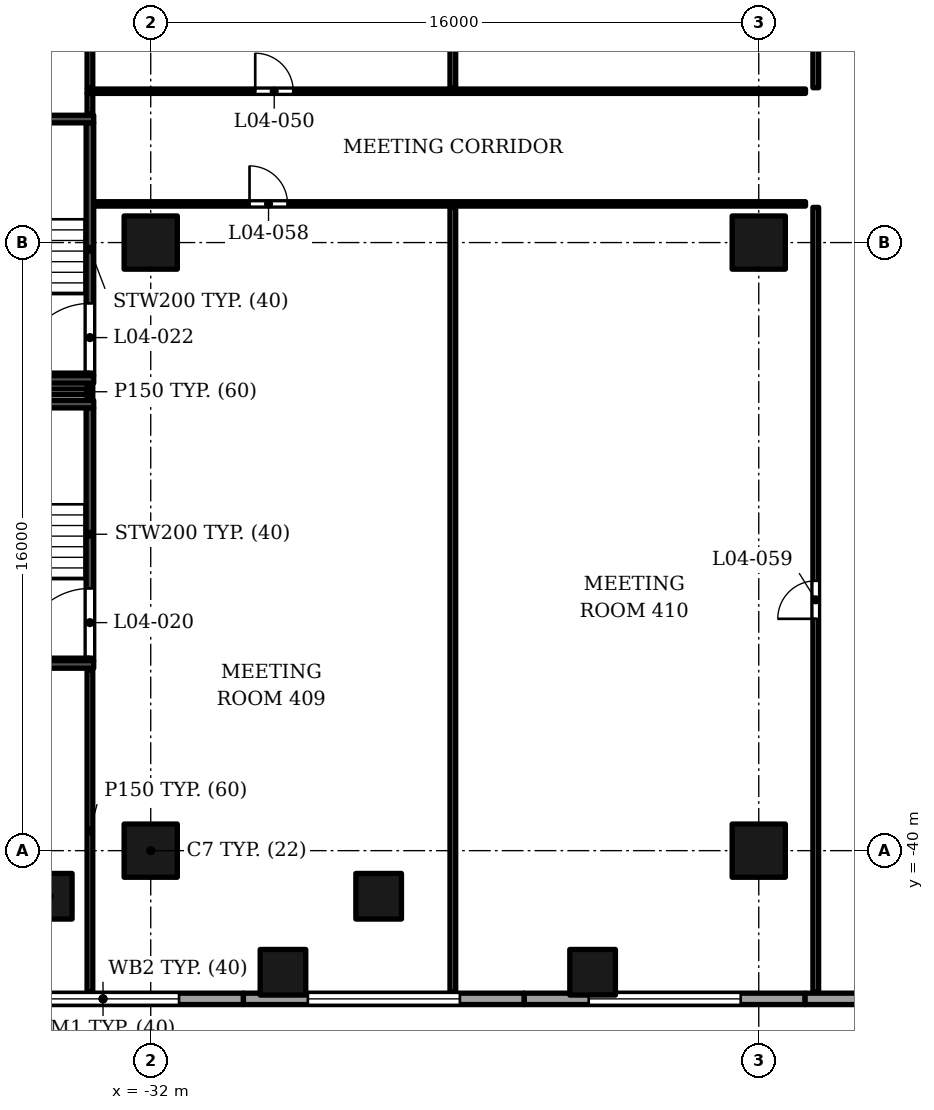
"""IFC4 building model, lengths in metres.
Left out: names, types, materials, properties, quantities, classifications, styles, units other than length and angle.
Written with IfcOpenShell. Run it as: python <this file> out.ifc"""

import sys

from ifc_helpers import new_model, si_unit, direction, frame, frame_2d, origin, origin_2d, place, context, subcontext, project, spatial, rectangle, extrude, element, fill, save


model = new_model("IFC4")
c1 = context("Model", 3, precision=1e-05, world=origin(), true_north=direction((0.0, 1.0)))
c2 = subcontext(c1, "Body", "Model", "MODEL_VIEW")
j1 = project(units=[si_unit("LENGTHUNIT", "METRE"), si_unit("PLANEANGLEUNIT", "RADIAN")], contexts=[c1])
p1 = place(None, origin())
s1 = spatial("IfcSite", under=j1, at=p1, CompositionType="ELEMENT")
p2 = place(p1, origin())
s2 = spatial("IfcBuilding", under=s1, at=p2, CompositionType="ELEMENT")
p3 = place(p2, frame((0.0, 0.0, 34.5)))
s3 = spatial("IfcBuildingStorey", under=s2, at=p3, CompositionType="ELEMENT", Elevation=34.5)
for number, where, z_axis, x_axis in (
    (1, (-32.0, -40.0, 0.0), (0.0, 0.0, 1.0), (1.0, 0.0, 0.0)),
    (2, (-32.0, -24.0, 0.0), (0.0, 0.0, 1.0), (1.0, 0.0, 0.0)),
    (3, (-16.0, -40.0, 0.0), (0.0, 0.0, 1.0), (1.0, 0.0, 0.0)),
    (4, (-16.0, -24.0, 0.0), (0.0, 0.0, 1.0), (1.0, 0.0, 0.0)),
):
    element("IfcColumn", number, at=place(p3, frame(where, z_axis=z_axis, x_axis=x_axis)), inside=s3, PredefinedType="COLUMN", context=c2, shape_type="SweptSolid", body=[
        extrude(rectangle(XDim=1.4, YDim=1.4, at=origin_2d()), origin(), (0.0, 0.0, 1.0), 5.5),
    ])
for number, where, z_axis, x_axis in (
    (5, (-34.669, -41.2, 0.0), (0.0, 0.0, 1.0), (1.0, 0.0, 0.0)),
    (6, (-26.002, -41.2, 0.0), (0.0, 0.0, 1.0), (1.0, 0.0, 0.0)),
    (7, (-20.372, -43.2, 0.0), (0.0, 0.0, 1.0), (1.0, 0.0, 0.0)),
    (8, (-28.52, -43.2, 0.0), (0.0, 0.0, 1.0), (1.0, 0.0, 0.0)),
):
    element("IfcColumn", number, at=place(p3, frame(where, z_axis=z_axis, x_axis=x_axis)), inside=s3, PredefinedType="COLUMN", context=c2, shape_type="SweptSolid", body=[
        extrude(rectangle(XDim=1.2, YDim=1.2, at=origin_2d()), origin(), (0.0, 0.0, 1.0), 5.5),
    ])
p4 = place(p3, frame((-36.95, -43.9, 0.0), z_axis=(0.0, 0.0, 1.0), x_axis=(1.0, 0.0, 0.0)))
e9 = element("IfcWall", 9, at=p4, inside=s3, PredefinedType="SOLIDWALL", context=c2, shape_type="SweptSolid", body=[
    extrude(rectangle(XDim=7.39, YDim=0.3, at=frame_2d((3.695, 0.0))), origin(), (0.0, 0.0, 1.0), 4.1),
])
p5 = place(p4, frame((1.695, 0.0, 1.0)))
e10 = element("IfcOpeningElement", 10, at=p5, cuts=e9, PredefinedType="OPENING", context=c2, shape_type="SweptSolid", body=[
    extrude(rectangle(XDim=4.0, YDim=1.8, at=frame_2d((2.0, 0.9))), frame((0.0, 0.16, 0.0), z_axis=(0.0, -1.0, 0.0), x_axis=(1.0, 0.0, 0.0)), (0.0, 0.0, 1.0), 0.32),
])
p6 = place(p3, frame((-29.56, -43.9, 0.0), z_axis=(0.0, 0.0, 1.0), x_axis=(1.0, 0.0, 0.0)))
e11 = element("IfcWall", 11, at=p6, inside=s3, PredefinedType="SOLIDWALL", context=c2, shape_type="SweptSolid", body=[
    extrude(rectangle(XDim=7.39, YDim=0.3, at=frame_2d((3.695, 0.0))), origin(), (0.0, 0.0, 1.0), 4.1),
])
p7 = place(p6, frame((1.695, 0.0, 1.0)))
e12 = element("IfcOpeningElement", 12, at=p7, cuts=e11, PredefinedType="OPENING", context=c2, shape_type="SweptSolid", body=[
    extrude(rectangle(XDim=4.0, YDim=1.8, at=frame_2d((2.0, 0.9))), frame((0.0, 0.16, 0.0), z_axis=(0.0, -1.0, 0.0), x_axis=(1.0, 0.0, 0.0)), (0.0, 0.0, 1.0), 0.32),
])
p8 = place(p3, frame((-22.17, -43.9, 0.0), z_axis=(0.0, 0.0, 1.0), x_axis=(1.0, 0.0, 0.0)))
e13 = element("IfcWall", 13, at=p8, inside=s3, PredefinedType="SOLIDWALL", context=c2, shape_type="SweptSolid", body=[
    extrude(rectangle(XDim=7.39, YDim=0.3, at=frame_2d((3.695, 0.0))), origin(), (0.0, 0.0, 1.0), 4.1),
])
p9 = place(p8, frame((1.695, 0.0, 1.0)))
e14 = element("IfcOpeningElement", 14, at=p9, cuts=e13, PredefinedType="OPENING", context=c2, shape_type="SweptSolid", body=[
    extrude(rectangle(XDim=4.0, YDim=1.8, at=frame_2d((2.0, 0.9))), frame((0.0, 0.16, 0.0), z_axis=(0.0, -1.0, 0.0), x_axis=(1.0, 0.0, 0.0)), (0.0, 0.0, 1.0), 0.32),
])
p10 = place(p3, frame((-14.78, -43.9, 0.0), z_axis=(0.0, 0.0, 1.0), x_axis=(1.0, 0.0, 0.0)))
e15 = element("IfcWall", 15, at=p10, inside=s3, PredefinedType="SOLIDWALL", context=c2, shape_type="SweptSolid", body=[
    extrude(rectangle(XDim=7.39, YDim=0.3, at=frame_2d((3.695, 0.0))), origin(), (0.0, 0.0, 1.0), 4.1),
])
p11 = place(p10, frame((1.695, 0.0, 1.0)))
e16 = element("IfcOpeningElement", 16, at=p11, cuts=e15, PredefinedType="OPENING", context=c2, shape_type="SweptSolid", body=[
    extrude(rectangle(XDim=4.0, YDim=1.8, at=frame_2d((2.0, 0.9))), frame((0.0, 0.16, 0.0), z_axis=(0.0, -1.0, 0.0), x_axis=(1.0, 0.0, 0.0)), (0.0, 0.0, 1.0), 0.32),
])
for number, where, z_axis, x_axis in (
    (17, (-37.0, -43.85, 5.5), (0.0, 0.0, 1.0), (1.0, 0.0, 0.0)),
    (18, (-22.2, -43.85, 5.5), (0.0, 0.0, 1.0), (1.0, 0.0, 0.0)),
):
    element("IfcWall", number, at=place(p3, frame(where, z_axis=z_axis, x_axis=x_axis)), inside=s3, PredefinedType="PARAPET", context=c2, shape_type="SweptSolid", body=[
        extrude(rectangle(XDim=14.8, YDim=0.3, at=frame_2d((7.4, 0.0))), origin(), (0.0, 0.0, 1.0), 1.1),
    ])
for number, where, z_axis, x_axis in (
    (19, (-38.37, -35.1, 0.0), (0.0, 0.0, 1.0), (1.0, 0.0, 0.0)),
    (20, (-38.37, -28.25, 0.0), (0.0, 0.0, 1.0), (1.0, 0.0, 0.0)),
):
    element("IfcWall", number, at=place(p3, frame(where, z_axis=z_axis, x_axis=x_axis)), inside=s3, PredefinedType="SOLIDWALL", context=c2, shape_type="SweptSolid", body=[
        extrude(rectangle(XDim=4.87, YDim=0.2, at=frame_2d((2.435, 0.0))), origin(), (0.0, 0.0, 1.0), 5.05),
    ])
p12 = place(p3, frame((-33.6, -35.0, 0.0), z_axis=(0.0, 0.0, 1.0), x_axis=(0.0, 1.0, 0.0)))
e21 = element("IfcWall", 21, at=p12, inside=s3, PredefinedType="SOLIDWALL", context=c2, shape_type="SweptSolid", body=[
    extrude(rectangle(XDim=6.65, YDim=0.2, at=frame_2d((3.325, 0.0))), origin(), (0.0, 0.0, 1.0), 5.05),
])
p13 = place(p12, frame((0.1, 0.0, 0.0)))
e22 = element("IfcOpeningElement", 22, at=p13, cuts=e21, PredefinedType="OPENING", context=c2, shape_type="SweptSolid", body=[
    extrude(rectangle(XDim=1.8, YDim=2.4, at=frame_2d((0.9, 1.2))), frame((0.0, 0.11, 0.0), z_axis=(0.0, -1.0, 0.0), x_axis=(1.0, 0.0, 0.0)), (0.0, 0.0, 1.0), 0.22),
])
for number, where, z_axis, x_axis in (
    (23, (-38.37, -27.6, 0.0), (0.0, 0.0, 1.0), (1.0, 0.0, 0.0)),
    (24, (-38.37, -20.75, 0.0), (0.0, 0.0, 1.0), (1.0, 0.0, 0.0)),
):
    element("IfcWall", number, at=place(p3, frame(where, z_axis=z_axis, x_axis=x_axis)), inside=s3, PredefinedType="SOLIDWALL", context=c2, shape_type="SweptSolid", body=[
        extrude(rectangle(XDim=4.87, YDim=0.2, at=frame_2d((2.435, 0.0))), origin(), (0.0, 0.0, 1.0), 5.05),
    ])
p14 = place(p3, frame((-33.6, -27.5, 0.0), z_axis=(0.0, 0.0, 1.0), x_axis=(0.0, 1.0, 0.0)))
e25 = element("IfcWall", 25, at=p14, inside=s3, PredefinedType="SOLIDWALL", context=c2, shape_type="SweptSolid", body=[
    extrude(rectangle(XDim=6.65, YDim=0.2, at=frame_2d((3.325, 0.0))), origin(), (0.0, 0.0, 1.0), 5.05),
])
p15 = place(p14, frame((0.1, 0.0, 0.0)))
e26 = element("IfcOpeningElement", 26, at=p15, cuts=e25, PredefinedType="OPENING", context=c2, shape_type="SweptSolid", body=[
    extrude(rectangle(XDim=1.8, YDim=2.4, at=frame_2d((0.9, 1.2))), frame((0.0, 0.11, 0.0), z_axis=(0.0, -1.0, 0.0), x_axis=(1.0, 0.0, 0.0)), (0.0, 0.0, 1.0), 0.22),
])
p16 = place(p3, frame((-33.6, -43.72, 0.0), z_axis=(0.0, 0.0, 1.0), x_axis=(0.0, 1.0, 0.0)))
e27 = element("IfcWall", 27, at=p16, inside=s3, PredefinedType="PARTITIONING", context=c2, shape_type="SweptSolid", body=[
    extrude(rectangle(XDim=8.48, YDim=0.15, at=frame_2d((4.24, 0.0))), origin(), (0.0, 0.0, 1.0), 3.85),
])
p17 = place(p3, frame((-24.05, -43.72, 0.0), z_axis=(0.0, 0.0, 1.0), x_axis=(0.0, 1.0, 0.0)))
e28 = element("IfcWall", 28, at=p17, inside=s3, PredefinedType="PARTITIONING", context=c2, shape_type="SweptSolid", body=[
    extrude(rectangle(XDim=20.645, YDim=0.15, at=frame_2d((10.323, 0.0))), origin(), (0.0, 0.0, 1.0), 3.85),
])
p18 = place(p3, frame((-14.5, -43.72, 0.0), z_axis=(0.0, 0.0, 1.0), x_axis=(0.0, 1.0, 0.0)))
e29 = element("IfcWall", 29, at=p18, inside=s3, PredefinedType="PARTITIONING", context=c2, shape_type="SweptSolid", body=[
    extrude(rectangle(XDim=20.645, YDim=0.15, at=frame_2d((10.323, 0.0))), origin(), (0.0, 0.0, 1.0), 3.85),
])
p19 = place(p18, frame((9.82, 0.0, 0.0)))
e30 = element("IfcOpeningElement", 30, at=p19, cuts=e29, PredefinedType="OPENING", context=c2, shape_type="SweptSolid", body=[
    extrude(rectangle(XDim=1.0, YDim=2.1, at=frame_2d((0.5, 1.05))), frame((0.0, 0.085, 0.0), z_axis=(0.0, -1.0, 0.0), x_axis=(1.0, 0.0, 0.0)), (0.0, 0.0, 1.0), 0.17),
])
p20 = place(p3, frame((-33.6, -28.11, 0.0), z_axis=(0.0, 0.0, 1.0), x_axis=(0.0, 1.0, 0.0)))
e31 = element("IfcWall", 31, at=p20, inside=s3, PredefinedType="PARTITIONING", context=c2, shape_type="SweptSolid", body=[
    extrude(rectangle(XDim=0.37, YDim=0.15, at=frame_2d((0.185, 0.0))), origin(), (0.0, 0.0, 1.0), 5.05),
])
p21 = place(p3, frame((-41.72, -27.925, 0.0), z_axis=(0.0, 0.0, 1.0), x_axis=(1.0, 0.0, 0.0)))
e32 = element("IfcWall", 32, at=p21, inside=s3, PredefinedType="PARTITIONING", context=c2, shape_type="SweptSolid", body=[
    extrude(rectangle(XDim=8.045, YDim=0.15, at=frame_2d((4.022, 0.0))), origin(), (0.0, 0.0, 1.0), 4.15),
])
p22 = place(p3, frame((-33.46, -22.982, 0.0), z_axis=(0.0, 0.0, 1.0), x_axis=(1.0, 0.0, 0.0)))
e33 = element("IfcWall", 33, at=p22, inside=s3, PredefinedType="PARTITIONING", context=c2, shape_type="SweptSolid", body=[
    extrude(rectangle(XDim=18.69, YDim=0.115, at=frame_2d((9.345, 0.0))), origin(), (0.0, 0.0, 1.0), 3.85),
])
p23 = place(p22, frame((4.06, 0.0, 0.0)))
e34 = element("IfcOpeningElement", 34, at=p23, cuts=e33, PredefinedType="OPENING", context=c2, shape_type="SweptSolid", body=[
    extrude(rectangle(XDim=1.0, YDim=2.1, at=frame_2d((0.5, 1.05))), frame((0.0, 0.067, 0.0), z_axis=(0.0, -1.0, 0.0), x_axis=(1.0, 0.0, 0.0)), (0.0, 0.0, 1.0), 0.135),
])
p24 = place(p3, frame((-33.6, -20.61, 0.0), z_axis=(0.0, 0.0, 1.0), x_axis=(0.0, 1.0, 0.0)))
e35 = element("IfcWall", 35, at=p24, inside=s3, PredefinedType="PARTITIONING", context=c2, shape_type="SweptSolid", body=[
    extrude(rectangle(XDim=0.535, YDim=0.15, at=frame_2d((0.268, 0.0))), origin(), (0.0, 0.0, 1.0), 5.05),
])
p25 = place(p3, frame((-33.675, -20.018, 0.0), z_axis=(0.0, 0.0, 1.0), x_axis=(1.0, 0.0, 0.0)))
e36 = element("IfcWall", 36, at=p25, inside=s3, PredefinedType="PARTITIONING", context=c2, shape_type="SweptSolid", body=[
    extrude(rectangle(XDim=18.905, YDim=0.115, at=frame_2d((9.453, 0.0))), origin(), (0.0, 0.0, 1.0), 3.85),
])
p26 = place(p25, frame((4.425, 0.0, 0.0)))
e37 = element("IfcOpeningElement", 37, at=p26, cuts=e36, PredefinedType="OPENING", context=c2, shape_type="SweptSolid", body=[
    extrude(rectangle(XDim=1.0, YDim=2.1, at=frame_2d((0.5, 1.05))), frame((0.0, 0.067, 0.0), z_axis=(0.0, -1.0, 0.0), x_axis=(1.0, 0.0, 0.0)), (0.0, 0.0, 1.0), 0.135),
])
p27 = place(p3, frame((-33.6, -19.925, 0.0), z_axis=(0.0, 0.0, 1.0), x_axis=(0.0, 1.0, 0.0)))
e38 = element("IfcWall", 38, at=p27, inside=s3, PredefinedType="PARTITIONING", context=c2, shape_type="SweptSolid", body=[
    extrude(rectangle(XDim=3.725, YDim=0.15, at=frame_2d((1.863, 0.0))), origin(), (0.0, 0.0, 1.0), 5.05),
])
p28 = place(p3, frame((-24.05, -19.925, 0.0), z_axis=(0.0, 0.0, 1.0), x_axis=(0.0, 1.0, 0.0)))
e39 = element("IfcWall", 39, at=p28, inside=s3, PredefinedType="PARTITIONING", context=c2, shape_type="SweptSolid", body=[
    extrude(rectangle(XDim=17.85, YDim=0.15, at=frame_2d((8.925, 0.0))), origin(), (0.0, 0.0, 1.0), 3.85),
])
p29 = place(p3, frame((-14.5, -19.925, 0.0), z_axis=(0.0, 0.0, 1.0), x_axis=(0.0, 1.0, 0.0)))
e40 = element("IfcWall", 40, at=p29, inside=s3, PredefinedType="PARTITIONING", context=c2, shape_type="SweptSolid", body=[
    extrude(rectangle(XDim=17.85, YDim=0.15, at=frame_2d((8.925, 0.0))), origin(), (0.0, 0.0, 1.0), 3.85),
])
p30 = place(p29, frame((8.525, 0.0, 0.0)))
e41 = element("IfcOpeningElement", 41, at=p30, cuts=e40, PredefinedType="OPENING", context=c2, shape_type="SweptSolid", body=[
    extrude(rectangle(XDim=1.0, YDim=2.1, at=frame_2d((0.5, 1.05))), frame((0.0, 0.085, 0.0), z_axis=(0.0, -1.0, 0.0), x_axis=(1.0, 0.0, 0.0)), (0.0, 0.0, 1.0), 0.17),
])
p31 = place(p5, origin())
e42 = element("IfcWindow", 42, at=p31, inside=s3, PartitioningType="SINGLE_PANEL", PredefinedType="WINDOW", context=c2, shape_type="SweptSolid", body=[
    extrude(rectangle(XDim=4.0, YDim=1.8, at=frame_2d((2.0, 0.9))), frame((0.0, 0.03, 0.0), z_axis=(0.0, -1.0, 0.0), x_axis=(1.0, 0.0, 0.0)), (0.0, 0.0, 1.0), 0.06),
])
fill(e10, e42)
p32 = place(p7, origin())
e43 = element("IfcWindow", 43, at=p32, inside=s3, PartitioningType="SINGLE_PANEL", PredefinedType="WINDOW", context=c2, shape_type="SweptSolid", body=[
    extrude(rectangle(XDim=4.0, YDim=1.8, at=frame_2d((2.0, 0.9))), frame((0.0, 0.03, 0.0), z_axis=(0.0, -1.0, 0.0), x_axis=(1.0, 0.0, 0.0)), (0.0, 0.0, 1.0), 0.06),
])
fill(e12, e43)
p33 = place(p9, origin())
e44 = element("IfcWindow", 44, at=p33, inside=s3, PartitioningType="SINGLE_PANEL", PredefinedType="WINDOW", context=c2, shape_type="SweptSolid", body=[
    extrude(rectangle(XDim=4.0, YDim=1.8, at=frame_2d((2.0, 0.9))), frame((0.0, 0.03, 0.0), z_axis=(0.0, -1.0, 0.0), x_axis=(1.0, 0.0, 0.0)), (0.0, 0.0, 1.0), 0.06),
])
fill(e14, e44)
p34 = place(p13, origin())
e45 = element("IfcDoor", 45, at=p34, inside=s3, OperationType="DOUBLE_DOOR_SINGLE_SWING", PredefinedType="DOOR", context=c2, shape_type="SweptSolid", body=[
    extrude(rectangle(XDim=1.8, YDim=2.4, at=frame_2d((0.9, 1.2))), frame((0.0, 0.025, 0.0), z_axis=(0.0, -1.0, 0.0), x_axis=(1.0, 0.0, 0.0)), (0.0, 0.0, 1.0), 0.05),
])
fill(e22, e45)
p35 = place(p15, origin())
e46 = element("IfcDoor", 46, at=p35, inside=s3, OperationType="DOUBLE_DOOR_SINGLE_SWING", PredefinedType="DOOR", context=c2, shape_type="SweptSolid", body=[
    extrude(rectangle(XDim=1.8, YDim=2.4, at=frame_2d((0.9, 1.2))), frame((0.0, 0.025, 0.0), z_axis=(0.0, -1.0, 0.0), x_axis=(1.0, 0.0, 0.0)), (0.0, 0.0, 1.0), 0.05),
])
fill(e26, e46)
p36 = place(p26, origin())
e47 = element("IfcDoor", 47, at=p36, inside=s3, OperationType="SINGLE_SWING_LEFT", PredefinedType="DOOR", context=c2, shape_type="SweptSolid", body=[
    extrude(rectangle(XDim=1.0, YDim=2.1, at=frame_2d((0.5, 1.05))), frame((0.0, 0.025, 0.0), z_axis=(0.0, -1.0, 0.0), x_axis=(1.0, 0.0, 0.0)), (0.0, 0.0, 1.0), 0.05),
])
fill(e37, e47)
p37 = place(p23, origin())
e48 = element("IfcDoor", 48, at=p37, inside=s3, OperationType="SINGLE_SWING_LEFT", PredefinedType="DOOR", context=c2, shape_type="SweptSolid", body=[
    extrude(rectangle(XDim=1.0, YDim=2.1, at=frame_2d((0.5, 1.05))), frame((0.0, 0.025, 0.0), z_axis=(0.0, -1.0, 0.0), x_axis=(1.0, 0.0, 0.0)), (0.0, 0.0, 1.0), 0.05),
])
fill(e34, e48)
p38 = place(p19, origin())
e49 = element("IfcDoor", 49, at=p38, inside=s3, OperationType="SINGLE_SWING_LEFT", PredefinedType="DOOR", context=c2, shape_type="SweptSolid", body=[
    extrude(rectangle(XDim=1.0, YDim=2.1, at=frame_2d((0.5, 1.05))), frame((0.0, 0.025, 0.0), z_axis=(0.0, -1.0, 0.0), x_axis=(1.0, 0.0, 0.0)), (0.0, 0.0, 1.0), 0.05),
])
fill(e30, e49)
save(model, sys.argv[1])
